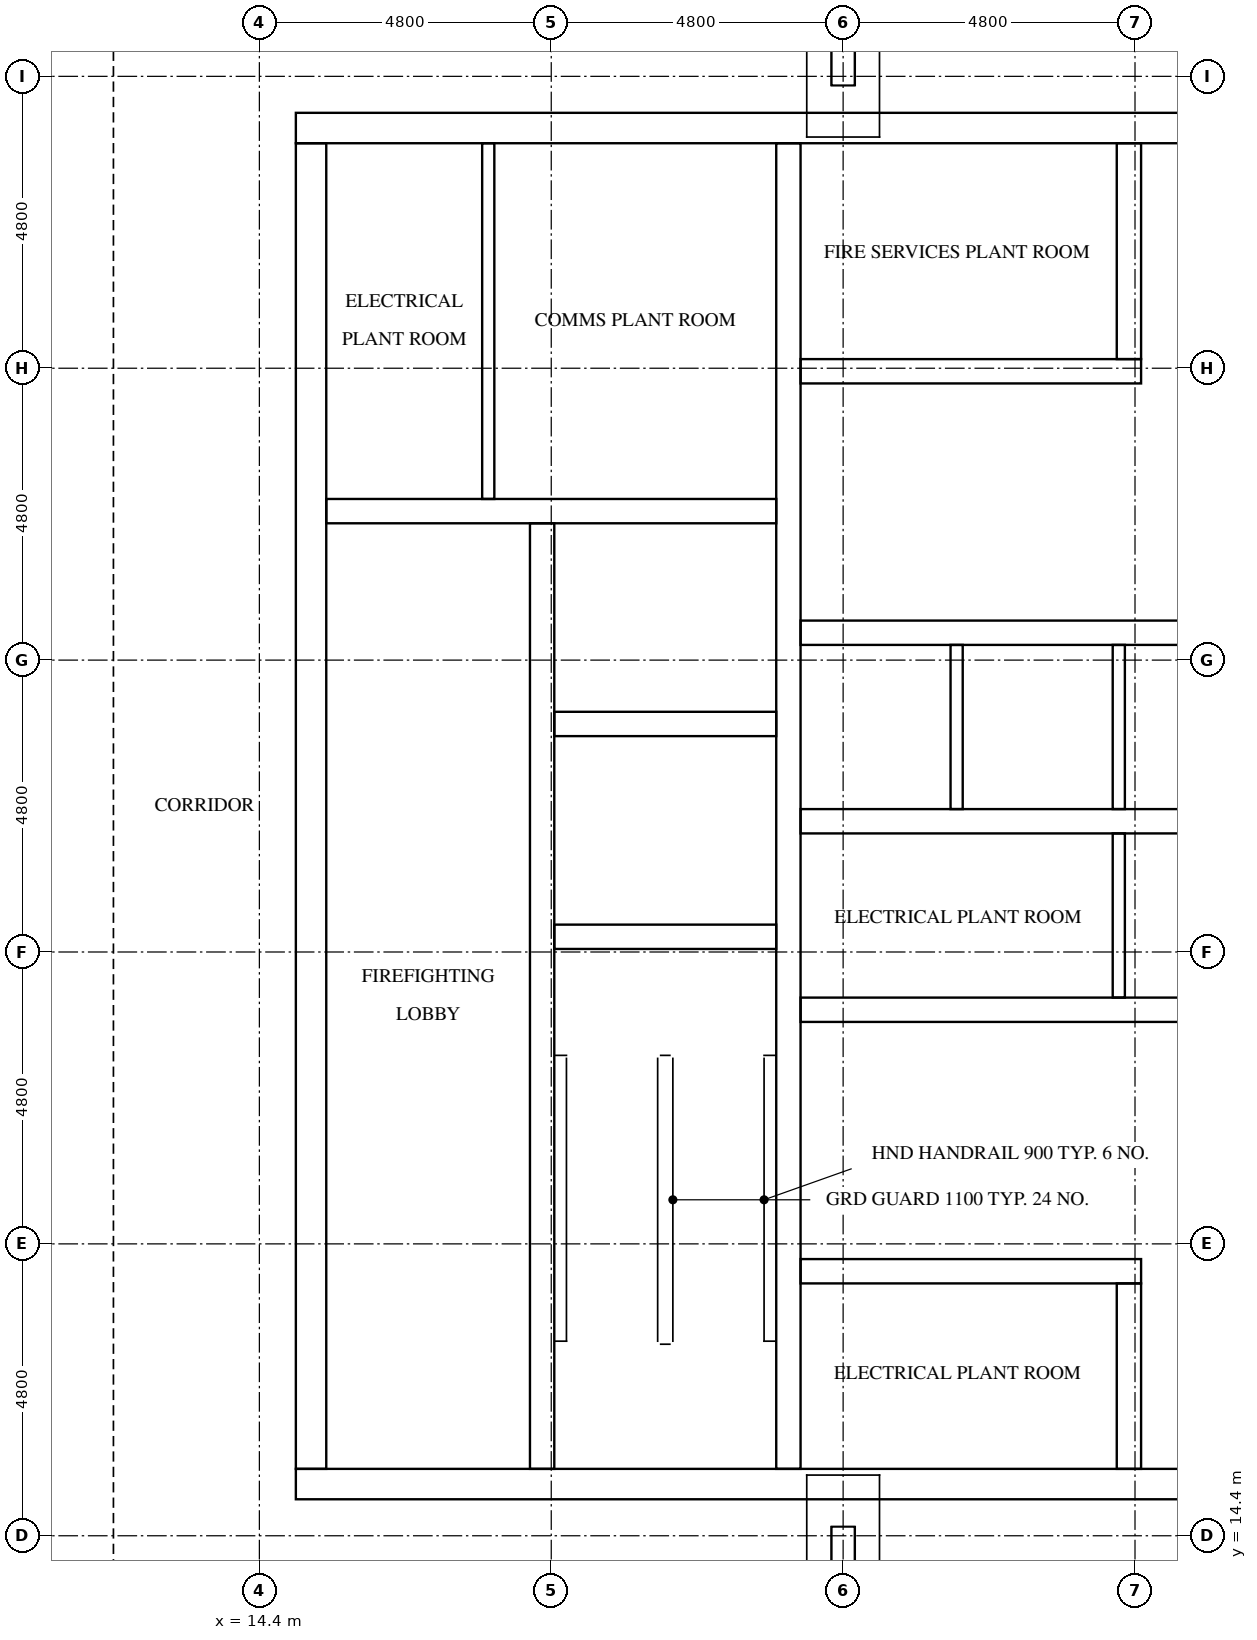
"""IFC4 building model, lengths in metres.
Left out: names, types, materials, properties, quantities, classifications, styles, units other than length and angle.
Written with IfcOpenShell. Run it as: python <this file> out.ifc"""

import sys

from ifc_helpers import new_model, si_unit, direction, frame, frame_2d, origin, place, context, subcontext, project, spatial, rectangle, extrude, element, fill, save


model = new_model("IFC4")
c1 = context("Model", 3, precision=1e-05, world=origin(), true_north=direction((0.0, 1.0)))
c2 = subcontext(c1, "Body", "Model", "MODEL_VIEW")
j1 = project(units=[si_unit("LENGTHUNIT", "METRE"), si_unit("PLANEANGLEUNIT", "RADIAN")], contexts=[c1])
p1 = place(None, origin())
s1 = spatial("IfcSite", under=j1, at=p1, CompositionType="ELEMENT")
p2 = place(p1, origin())
s2 = spatial("IfcBuilding", under=s1, at=p2, CompositionType="ELEMENT")
p3 = place(p2, frame((0.0, 0.0, 263.2)))
s3 = spatial("IfcBuildingStorey", under=s2, at=p3, CompositionType="ELEMENT", Elevation=263.2)
p4 = place(p3, frame((15.0, 15.25, 0.0), z_axis=(0.0, 0.0, 1.0), x_axis=(1.0, 0.0, 0.0)))
e1 = element("IfcWall", 1, at=p4, inside=s3, PredefinedType="SHEAR", context=c2, shape_type="SweptSolid", body=[
    extrude(rectangle(XDim=32.4, YDim=0.5, at=frame_2d((16.2, 0.0))), origin(), (0.0, 0.0, 1.0), 5.1),
])
p5 = place(p4, frame((15.3, 0.0, 0.0)))
e2 = element("IfcOpeningElement", 2, at=p5, cuts=e1, PredefinedType="OPENING", context=c2, shape_type="SweptSolid", body=[
    extrude(rectangle(XDim=1.8, YDim=2.1, at=frame_2d((0.9, 1.05))), frame((0.0, 0.26, 0.0), z_axis=(0.0, -1.0, 0.0), x_axis=(1.0, 0.0, 0.0)), (0.0, 0.0, 1.0), 0.52),
])
p6 = place(p3, frame((15.0, 37.55, 0.0), z_axis=(0.0, 0.0, 1.0), x_axis=(1.0, 0.0, 0.0)))
e3 = element("IfcWall", 3, at=p6, inside=s3, PredefinedType="SHEAR", context=c2, shape_type="SweptSolid", body=[
    extrude(rectangle(XDim=32.4, YDim=0.5, at=frame_2d((16.2, 0.0))), origin(), (0.0, 0.0, 1.0), 5.1),
])
p7 = place(p6, frame((15.3, 0.0, 0.0)))
e4 = element("IfcOpeningElement", 4, at=p7, cuts=e3, PredefinedType="OPENING", context=c2, shape_type="SweptSolid", body=[
    extrude(rectangle(XDim=1.8, YDim=2.1, at=frame_2d((0.9, 1.05))), frame((0.0, 0.26, 0.0), z_axis=(0.0, -1.0, 0.0), x_axis=(1.0, 0.0, 0.0)), (0.0, 0.0, 1.0), 0.52),
])
p8 = place(p6, frame((1.282, 0.0, 0.0)))
e5 = element("IfcOpeningElement", 5, at=p8, cuts=e3, PredefinedType="OPENING", context=c2, shape_type="SweptSolid", body=[
    extrude(rectangle(XDim=1.0, YDim=2.1, at=frame_2d((0.5, 1.05))), frame((0.0, 0.26, 0.0), z_axis=(0.0, -1.0, 0.0), x_axis=(1.0, 0.0, 0.0)), (0.0, 0.0, 1.0), 0.52),
])
p9 = place(p6, frame((5.082, 0.0, 0.0)))
e6 = element("IfcOpeningElement", 6, at=p9, cuts=e3, PredefinedType="OPENING", context=c2, shape_type="SweptSolid", body=[
    extrude(rectangle(XDim=1.0, YDim=2.1, at=frame_2d((0.5, 1.05))), frame((0.0, 0.26, 0.0), z_axis=(0.0, -1.0, 0.0), x_axis=(1.0, 0.0, 0.0)), (0.0, 0.0, 1.0), 0.52),
])
p10 = place(p3, frame((15.25, 15.5, 0.0), z_axis=(0.0, 0.0, 1.0), x_axis=(0.0, 1.0, 0.0)))
e7 = element("IfcWall", 7, at=p10, inside=s3, PredefinedType="SHEAR", context=c2, shape_type="SweptSolid", body=[
    extrude(rectangle(XDim=21.8, YDim=0.5, at=frame_2d((10.9, 0.0))), origin(), (0.0, 0.0, 1.0), 5.1),
])
p11 = place(p10, frame((5.26, 0.0, 0.0)))
e8 = element("IfcOpeningElement", 8, at=p11, cuts=e7, PredefinedType="OPENING", context=c2, shape_type="SweptSolid", body=[
    extrude(rectangle(XDim=1.2, YDim=2.1, at=frame_2d((0.6, 1.05))), frame((0.0, 0.26, 0.0), z_axis=(0.0, -1.0, 0.0), x_axis=(1.0, 0.0, 0.0)), (0.0, 0.0, 1.0), 0.52),
])
p12 = place(p3, frame((19.05, 15.5, 0.0), z_axis=(0.0, 0.0, 1.0), x_axis=(0.0, 1.0, 0.0)))
e9 = element("IfcWall", 9, at=p12, inside=s3, PredefinedType="SHEAR", context=c2, shape_type="SweptSolid", body=[
    extrude(rectangle(XDim=15.55, YDim=0.4, at=frame_2d((7.775, 0.0))), origin(), (0.0, 0.0, 1.0), 5.1),
])
p13 = place(p12, frame((9.95, 0.0, 0.0)))
e10 = element("IfcOpeningElement", 10, at=p13, cuts=e9, PredefinedType="OPENING", context=c2, shape_type="SweptSolid", body=[
    extrude(rectangle(XDim=1.1, YDim=2.1, at=frame_2d((0.55, 1.05))), frame((0.0, 0.21, 0.0), z_axis=(0.0, -1.0, 0.0), x_axis=(1.0, 0.0, 0.0)), (0.0, 0.0, 1.0), 0.42),
])
p14 = place(p12, frame((13.45, 0.0, 0.0)))
e11 = element("IfcOpeningElement", 11, at=p14, cuts=e9, PredefinedType="OPENING", context=c2, shape_type="SweptSolid", body=[
    extrude(rectangle(XDim=1.1, YDim=2.1, at=frame_2d((0.55, 1.05))), frame((0.0, 0.21, 0.0), z_axis=(0.0, -1.0, 0.0), x_axis=(1.0, 0.0, 0.0)), (0.0, 0.0, 1.0), 0.42),
])
p15 = place(p12, frame((0.7, 0.0, 0.0)))
e12 = element("IfcOpeningElement", 12, at=p15, cuts=e9, PredefinedType="OPENING", context=c2, shape_type="SweptSolid", body=[
    extrude(rectangle(XDim=1.2, YDim=2.1, at=frame_2d((0.6, 1.05))), frame((0.0, 0.21, 0.0), z_axis=(0.0, -1.0, 0.0), x_axis=(1.0, 0.0, 0.0)), (0.0, 0.0, 1.0), 0.42),
])
p16 = place(p3, frame((23.1, 15.5, 0.0), z_axis=(0.0, 0.0, 1.0), x_axis=(0.0, 1.0, 0.0)))
e13 = element("IfcWall", 13, at=p16, inside=s3, PredefinedType="SHEAR", context=c2, shape_type="SweptSolid", body=[
    extrude(rectangle(XDim=21.8, YDim=0.4, at=frame_2d((10.9, 0.0))), origin(), (0.0, 0.0, 1.0), 5.1),
])
for number, where, z_axis, x_axis in (
    (14, (19.25, 24.25, 0.0), (0.0, 0.0, 1.0), (1.0, 0.0, 0.0)),
    (15, (19.25, 27.75, 0.0), (0.0, 0.0, 1.0), (1.0, 0.0, 0.0)),
):
    element("IfcWall", number, at=place(p3, frame(where, z_axis=z_axis, x_axis=x_axis)), inside=s3, PredefinedType="SHEAR", context=c2, shape_type="SweptSolid", body=[
        extrude(rectangle(XDim=3.65, YDim=0.4, at=frame_2d((1.825, 0.0))), origin(), (0.0, 0.0, 1.0), 5.1),
    ])
p17 = place(p3, frame((15.5, 31.25, 0.0), z_axis=(0.0, 0.0, 1.0), x_axis=(1.0, 0.0, 0.0)))
e16 = element("IfcWall", 16, at=p17, inside=s3, PredefinedType="SHEAR", context=c2, shape_type="SweptSolid", body=[
    extrude(rectangle(XDim=7.4, YDim=0.4, at=frame_2d((3.7, 0.0))), origin(), (0.0, 0.0, 1.0), 5.1),
])
p18 = place(p3, frame((23.3, 18.75, 0.0), z_axis=(0.0, 0.0, 1.0), x_axis=(1.0, 0.0, 0.0)))
e17 = element("IfcWall", 17, at=p18, inside=s3, PredefinedType="SHEAR", context=c2, shape_type="SweptSolid", body=[
    extrude(rectangle(XDim=5.6, YDim=0.4, at=frame_2d((2.8, 0.0))), origin(), (0.0, 0.0, 1.0), 5.1),
])
p19 = place(p18, frame((2.1, 0.0, 0.0)))
e18 = element("IfcOpeningElement", 18, at=p19, cuts=e17, PredefinedType="OPENING", context=c2, shape_type="SweptSolid", body=[
    extrude(rectangle(XDim=1.0, YDim=2.1, at=frame_2d((0.5, 1.05))), frame((0.0, 0.21, 0.0), z_axis=(0.0, -1.0, 0.0), x_axis=(1.0, 0.0, 0.0)), (0.0, 0.0, 1.0), 0.42),
])
p20 = place(p3, frame((23.3, 23.05, 0.0), z_axis=(0.0, 0.0, 1.0), x_axis=(1.0, 0.0, 0.0)))
e19 = element("IfcWall", 19, at=p20, inside=s3, PredefinedType="SHEAR", context=c2, shape_type="SweptSolid", body=[
    extrude(rectangle(XDim=15.8, YDim=0.4, at=frame_2d((7.9, 0.0))), origin(), (0.0, 0.0, 1.0), 5.1),
])
p21 = place(p20, frame((2.067, 0.0, 0.0)))
e20 = element("IfcOpeningElement", 20, at=p21, cuts=e19, PredefinedType="OPENING", context=c2, shape_type="SweptSolid", body=[
    extrude(rectangle(XDim=1.0, YDim=2.1, at=frame_2d((0.5, 1.05))), frame((0.0, 0.21, 0.0), z_axis=(0.0, -1.0, 0.0), x_axis=(1.0, 0.0, 0.0)), (0.0, 0.0, 1.0), 0.42),
])
p22 = place(p20, frame((12.733, 0.0, 0.0)))
e21 = element("IfcOpeningElement", 21, at=p22, cuts=e19, PredefinedType="OPENING", context=c2, shape_type="SweptSolid", body=[
    extrude(rectangle(XDim=1.0, YDim=2.1, at=frame_2d((0.5, 1.05))), frame((0.0, 0.21, 0.0), z_axis=(0.0, -1.0, 0.0), x_axis=(1.0, 0.0, 0.0)), (0.0, 0.0, 1.0), 0.42),
])
for number, where, z_axis, x_axis in (
    (22, (23.3, 26.15, 0.0), (0.0, 0.0, 1.0), (1.0, 0.0, 0.0)),
    (23, (23.3, 29.25, 0.0), (0.0, 0.0, 1.0), (1.0, 0.0, 0.0)),
):
    element("IfcWall", number, at=place(p3, frame(where, z_axis=z_axis, x_axis=x_axis)), inside=s3, PredefinedType="SHEAR", context=c2, shape_type="SweptSolid", body=[
        extrude(rectangle(XDim=15.8, YDim=0.4, at=frame_2d((7.9, 0.0))), origin(), (0.0, 0.0, 1.0), 5.1),
    ])
p23 = place(p3, frame((23.3, 33.55, 0.0), z_axis=(0.0, 0.0, 1.0), x_axis=(1.0, 0.0, 0.0)))
e24 = element("IfcWall", 24, at=p23, inside=s3, PredefinedType="SHEAR", context=c2, shape_type="SweptSolid", body=[
    extrude(rectangle(XDim=5.6, YDim=0.4, at=frame_2d((2.8, 0.0))), origin(), (0.0, 0.0, 1.0), 5.1),
])
p24 = place(p23, frame((2.1, 0.0, 0.0)))
e25 = element("IfcOpeningElement", 25, at=p24, cuts=e24, PredefinedType="OPENING", context=c2, shape_type="SweptSolid", body=[
    extrude(rectangle(XDim=1.0, YDim=2.1, at=frame_2d((0.5, 1.05))), frame((0.0, 0.21, 0.0), z_axis=(0.0, -1.0, 0.0), x_axis=(1.0, 0.0, 0.0)), (0.0, 0.0, 1.0), 0.42),
])
p25 = place(p3, frame((28.7, 15.5, 0.0), z_axis=(0.0, 0.0, 1.0), x_axis=(0.0, 1.0, 0.0)))
e26 = element("IfcWall", 26, at=p25, inside=s3, PredefinedType="SHEAR", context=c2, shape_type="SweptSolid", body=[
    extrude(rectangle(XDim=3.05, YDim=0.4, at=frame_2d((1.525, 0.0))), origin(), (0.0, 0.0, 1.0), 5.1),
])
p26 = place(p3, frame((28.7, 33.75, 0.0), z_axis=(0.0, 0.0, 1.0), x_axis=(0.0, 1.0, 0.0)))
e27 = element("IfcWall", 27, at=p26, inside=s3, PredefinedType="SHEAR", context=c2, shape_type="SweptSolid", body=[
    extrude(rectangle(XDim=3.55, YDim=0.4, at=frame_2d((1.775, 0.0))), origin(), (0.0, 0.0, 1.0), 5.1),
])
for number, where, z_axis, x_axis in (
    (28, (25.867, 26.35, 0.0), (0.0, 0.0, 1.0), (0.0, 1.0, 0.0)),
    (29, (28.533, 23.25, 0.0), (0.0, 0.0, 1.0), (0.0, 1.0, 0.0)),
    (30, (28.533, 26.35, 0.0), (0.0, 0.0, 1.0), (0.0, 1.0, 0.0)),
):
    element("IfcWall", number, at=place(p3, frame(where, z_axis=z_axis, x_axis=x_axis)), inside=s3, PredefinedType="SOLIDWALL", context=c2, shape_type="SweptSolid", body=[
        extrude(rectangle(XDim=2.7, YDim=0.2, at=frame_2d((1.35, 0.0))), origin(), (0.0, 0.0, 1.0), 5.1),
    ])
p27 = place(p3, frame((18.164, 31.45, 0.0), z_axis=(0.0, 0.0, 1.0), x_axis=(0.0, 1.0, 0.0)))
e31 = element("IfcWall", 31, at=p27, inside=s3, PredefinedType="PARTITIONING", context=c2, shape_type="SweptSolid", body=[
    extrude(rectangle(XDim=5.85, YDim=0.2, at=frame_2d((2.925, 0.0))), origin(), (0.0, 0.0, 1.0), 5.1),
])
p28 = place(p13, origin())
e32 = element("IfcDoor", 32, at=p28, inside=s3, OperationType="DOUBLE_DOOR_SLIDING", PredefinedType="DOOR", context=c2, shape_type="SweptSolid", body=[
    extrude(rectangle(XDim=1.1, YDim=2.1, at=frame_2d((0.55, 1.05))), frame((0.0, 0.025, 0.0), z_axis=(0.0, -1.0, 0.0), x_axis=(1.0, 0.0, 0.0)), (0.0, 0.0, 1.0), 0.05),
])
fill(e10, e32)
p29 = place(p14, origin())
e33 = element("IfcDoor", 33, at=p29, inside=s3, OperationType="DOUBLE_DOOR_SLIDING", PredefinedType="DOOR", context=c2, shape_type="SweptSolid", body=[
    extrude(rectangle(XDim=1.1, YDim=2.1, at=frame_2d((0.55, 1.05))), frame((0.0, 0.025, 0.0), z_axis=(0.0, -1.0, 0.0), x_axis=(1.0, 0.0, 0.0)), (0.0, 0.0, 1.0), 0.05),
])
fill(e11, e33)
p30 = place(p15, frame((1.2, 0.0, 0.0), z_axis=(0.0, 0.0, 1.0), x_axis=(-1.0, 0.0, 0.0)))
e34 = element("IfcDoor", 34, at=p30, inside=s3, OperationType="SINGLE_SWING_LEFT", PredefinedType="DOOR", context=c2, shape_type="SweptSolid", body=[
    extrude(rectangle(XDim=1.2, YDim=2.1, at=frame_2d((0.6, 1.05))), frame((0.0, 0.025, 0.0), z_axis=(0.0, -1.0, 0.0), x_axis=(1.0, 0.0, 0.0)), (0.0, 0.0, 1.0), 0.05),
])
fill(e12, e34)
p31 = place(p11, frame((1.2, 0.0, 0.0), z_axis=(0.0, 0.0, 1.0), x_axis=(-1.0, 0.0, 0.0)))
e35 = element("IfcDoor", 35, at=p31, inside=s3, OperationType="SINGLE_SWING_RIGHT", PredefinedType="DOOR", context=c2, shape_type="SweptSolid", body=[
    extrude(rectangle(XDim=1.2, YDim=2.1, at=frame_2d((0.6, 1.05))), frame((0.0, 0.025, 0.0), z_axis=(0.0, -1.0, 0.0), x_axis=(1.0, 0.0, 0.0)), (0.0, 0.0, 1.0), 0.05),
])
fill(e8, e35)
p32 = place(p8, origin())
e36 = element("IfcDoor", 36, at=p32, inside=s3, OperationType="SINGLE_SWING_RIGHT", PredefinedType="DOOR", context=c2, shape_type="SweptSolid", body=[
    extrude(rectangle(XDim=1.0, YDim=2.1, at=frame_2d((0.5, 1.05))), frame((0.0, 0.025, 0.0), z_axis=(0.0, -1.0, 0.0), x_axis=(1.0, 0.0, 0.0)), (0.0, 0.0, 1.0), 0.05),
])
fill(e5, e36)
p33 = place(p9, origin())
e37 = element("IfcDoor", 37, at=p33, inside=s3, OperationType="SINGLE_SWING_LEFT", PredefinedType="DOOR", context=c2, shape_type="SweptSolid", body=[
    extrude(rectangle(XDim=1.0, YDim=2.1, at=frame_2d((0.5, 1.05))), frame((0.0, 0.025, 0.0), z_axis=(0.0, -1.0, 0.0), x_axis=(1.0, 0.0, 0.0)), (0.0, 0.0, 1.0), 0.05),
])
fill(e6, e37)
p34 = place(p21, frame((1.0, 0.0, 0.0), z_axis=(0.0, 0.0, 1.0), x_axis=(-1.0, 0.0, 0.0)))
e38 = element("IfcDoor", 38, at=p34, inside=s3, OperationType="SINGLE_SWING_RIGHT", PredefinedType="DOOR", context=c2, shape_type="SweptSolid", body=[
    extrude(rectangle(XDim=1.0, YDim=2.1, at=frame_2d((0.5, 1.05))), frame((0.0, 0.025, 0.0), z_axis=(0.0, -1.0, 0.0), x_axis=(1.0, 0.0, 0.0)), (0.0, 0.0, 1.0), 0.05),
])
fill(e20, e38)
p35 = place(p19, origin())
e39 = element("IfcDoor", 39, at=p35, inside=s3, OperationType="SINGLE_SWING_RIGHT", PredefinedType="DOOR", context=c2, shape_type="SweptSolid", body=[
    extrude(rectangle(XDim=1.0, YDim=2.1, at=frame_2d((0.5, 1.05))), frame((0.0, 0.025, 0.0), z_axis=(0.0, -1.0, 0.0), x_axis=(1.0, 0.0, 0.0)), (0.0, 0.0, 1.0), 0.05),
])
fill(e18, e39)
p36 = place(p24, frame((1.0, 0.0, 0.0), z_axis=(0.0, 0.0, 1.0), x_axis=(-1.0, 0.0, 0.0)))
e40 = element("IfcDoor", 40, at=p36, inside=s3, OperationType="SINGLE_SWING_RIGHT", PredefinedType="DOOR", context=c2, shape_type="SweptSolid", body=[
    extrude(rectangle(XDim=1.0, YDim=2.1, at=frame_2d((0.5, 1.05))), frame((0.0, 0.025, 0.0), z_axis=(0.0, -1.0, 0.0), x_axis=(1.0, 0.0, 0.0)), (0.0, 0.0, 1.0), 0.05),
])
fill(e25, e40)
save(model, sys.argv[1])
